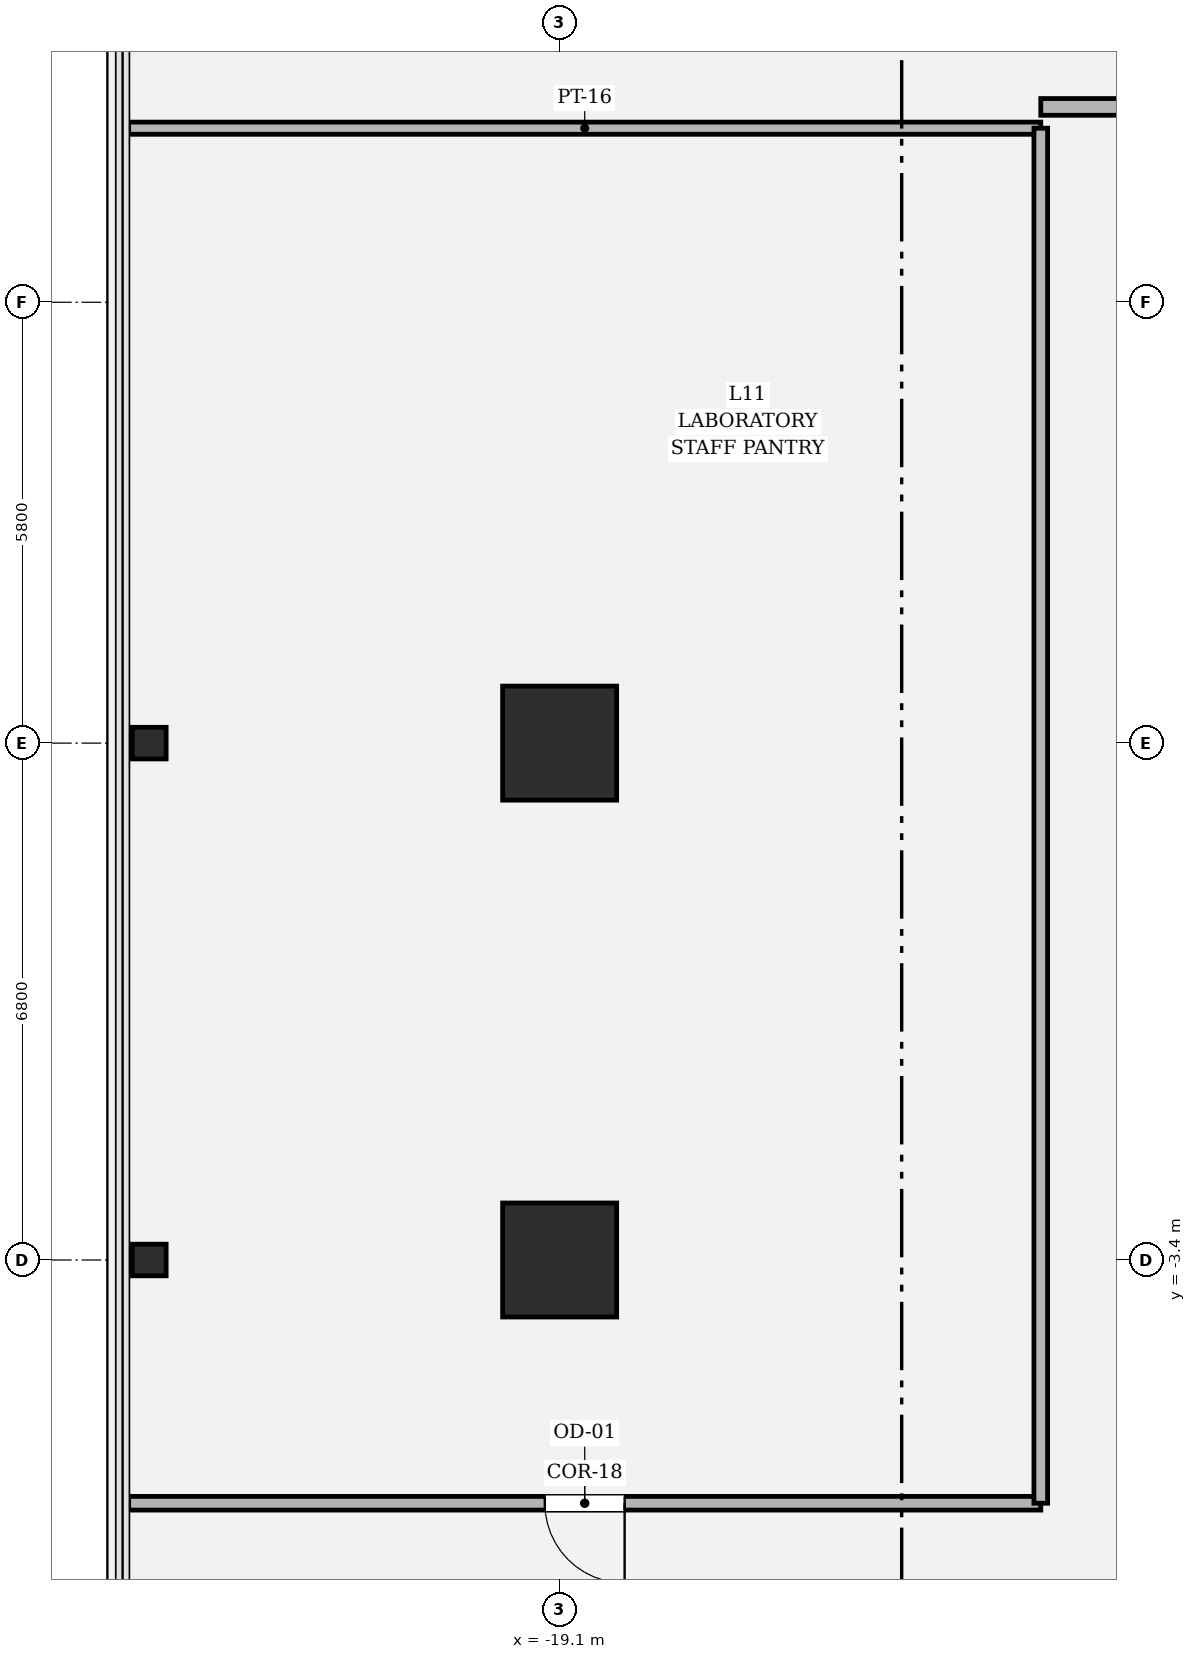
"""IFC4 building model, lengths in metres.
Left out: names, types, materials, properties, quantities, classifications, styles, units other than length and angle.
Written with IfcOpenShell. Run it as: python <this file> out.ifc"""

import sys

from ifc_helpers import new_model, si_unit, direction, frame, frame_2d, origin, origin_2d, place, context, subcontext, project, spatial, rectangle, hollow_rectangle, i_section, extrude, element, fill, save


model = new_model("IFC4")
c1 = context("Model", 3, precision=1e-05, world=origin(), true_north=direction((0.0, 1.0)))
c2 = subcontext(c1, "Body", "Model", "MODEL_VIEW")
j1 = project(units=[si_unit("LENGTHUNIT", "METRE"), si_unit("PLANEANGLEUNIT", "RADIAN")], contexts=[c1])
p1 = place(None, origin())
s1 = spatial("IfcSite", under=j1, at=p1, CompositionType="ELEMENT")
p2 = place(p1, origin())
s2 = spatial("IfcBuilding", under=s1, at=p2, CompositionType="ELEMENT")
p3 = place(p2, frame((0.0, 0.0, 52.5)))
s3 = spatial("IfcBuildingStorey", under=s2, at=p3, CompositionType="ELEMENT", Elevation=52.5)
for number, where, z_axis, x_axis in (
    (1, (-19.1, 3.4, 0.0), (0.0, 0.0, 1.0), (1.0, 0.0, 0.0)),
    (2, (-19.1, -3.4, 0.0), (0.0, 0.0, 1.0), (1.0, 0.0, 0.0)),
):
    element("IfcColumn", number, at=place(p3, frame(where, z_axis=z_axis, x_axis=x_axis)), inside=s3, PredefinedType="COLUMN", context=c2, shape_type="SweptSolid", body=[
        extrude(hollow_rectangle(XDim=1.5, YDim=1.5, WallThickness=0.045, at=origin_2d()), origin(), (0.0, 0.0, 1.0), 4.05),
    ])
for number, where, z_axis, x_axis in (
    (3, (-24.5, -3.4, 0.0), (0.0, 0.0, 1.0), (0.0, 1.0, 0.0)),
    (4, (-24.5, 3.4, 0.0), (0.0, 0.0, 1.0), (0.0, 1.0, 0.0)),
):
    element("IfcColumn", number, at=place(p3, frame(where, z_axis=z_axis, x_axis=x_axis)), inside=s3, PredefinedType="COLUMN", context=c2, shape_type="SweptSolid", body=[
        extrude(i_section(OverallWidth=0.416, OverallDepth=0.446, WebThickness=0.039, FlangeThickness=0.062, FilletRadius=0.018, at=origin_2d()), origin(), (0.0, 0.0, 1.0), 4.048),
    ])
p4 = place(p3, frame((-12.77, -6.6, 0.0), z_axis=(0.0, 0.0, 1.0), x_axis=(-1.0, 0.0, 0.0)))
e5 = element("IfcWall", 5, at=p4, inside=s3, PredefinedType="PARTITIONING", context=c2, shape_type="SweptSolid", body=[
    extrude(rectangle(XDim=12.0, YDim=0.18, at=frame_2d((6.0, 0.0))), origin(), (0.0, 0.0, 1.0), 2.524),
])
p5 = place(p4, frame((5.475, 0.0, 0.0)))
e6 = element("IfcOpeningElement", 6, at=p5, cuts=e5, PredefinedType="OPENING", context=c2, shape_type="SweptSolid", body=[
    extrude(rectangle(XDim=1.05, YDim=2.2, at=frame_2d((0.525, 1.1))), frame((0.0, 0.1, 0.0), z_axis=(0.0, -1.0, 0.0), x_axis=(1.0, 0.0, 0.0)), (0.0, 0.0, 1.0), 0.2),
])
p6 = place(p3, frame((-24.77, 11.49, 0.0), z_axis=(0.0, 0.0, 1.0), x_axis=(1.0, 0.0, 0.0)))
e7 = element("IfcWall", 7, at=p6, inside=s3, PredefinedType="PARTITIONING", context=c2, shape_type="SweptSolid", body=[
    extrude(rectangle(XDim=12.0, YDim=0.16, at=frame_2d((6.0, 0.0))), origin(), (0.0, 0.0, 1.0), 2.524),
])
p7 = place(p3, frame((-12.77, 11.49, 0.0), z_axis=(0.0, 0.0, 1.0), x_axis=(0.0, -1.0, 0.0)))
e8 = element("IfcWall", 8, at=p7, inside=s3, PredefinedType="PARTITIONING", context=c2, shape_type="SweptSolid", body=[
    extrude(rectangle(XDim=18.09, YDim=0.18, at=frame_2d((9.045, 0.0))), origin(), (0.0, 0.0, 1.0), 3.104),
])
p8 = place(p3, frame((4.948, 11.77, 0.0), z_axis=(0.0, 0.0, 1.0), x_axis=(-1.0, 0.0, 0.0)))
e9 = element("IfcWall", 9, at=p8, inside=s3, PredefinedType="SOLIDWALL", context=c2, shape_type="SweptSolid", body=[
    extrude(rectangle(XDim=17.718, YDim=0.22, at=frame_2d((8.859, 0.0))), origin(), (0.0, 0.0, 1.0), 3.104),
])
p9 = place(p8, frame((8.309, 0.0, 0.0)))
e10 = element("IfcOpeningElement", 10, at=p9, cuts=e9, PredefinedType="OPENING", context=c2, shape_type="SweptSolid", body=[
    extrude(rectangle(XDim=1.1, YDim=2.2, at=frame_2d((0.55, 1.1))), frame((0.0, 0.12, 0.0), z_axis=(0.0, -1.0, 0.0), x_axis=(1.0, 0.0, 0.0)), (0.0, 0.0, 1.0), 0.24),
])
p10 = place(p5, origin())
e11 = element("IfcDoor", 11, at=p10, inside=s3, OperationType="SINGLE_SWING_LEFT", PredefinedType="DOOR", context=c2, shape_type="SweptSolid", body=[
    extrude(rectangle(XDim=1.05, YDim=2.2, at=frame_2d((0.525, 1.1))), frame((0.0, 0.025, 0.0), z_axis=(0.0, -1.0, 0.0), x_axis=(1.0, 0.0, 0.0)), (0.0, 0.0, 1.0), 0.05),
])
fill(e6, e11)
save(model, sys.argv[1])
